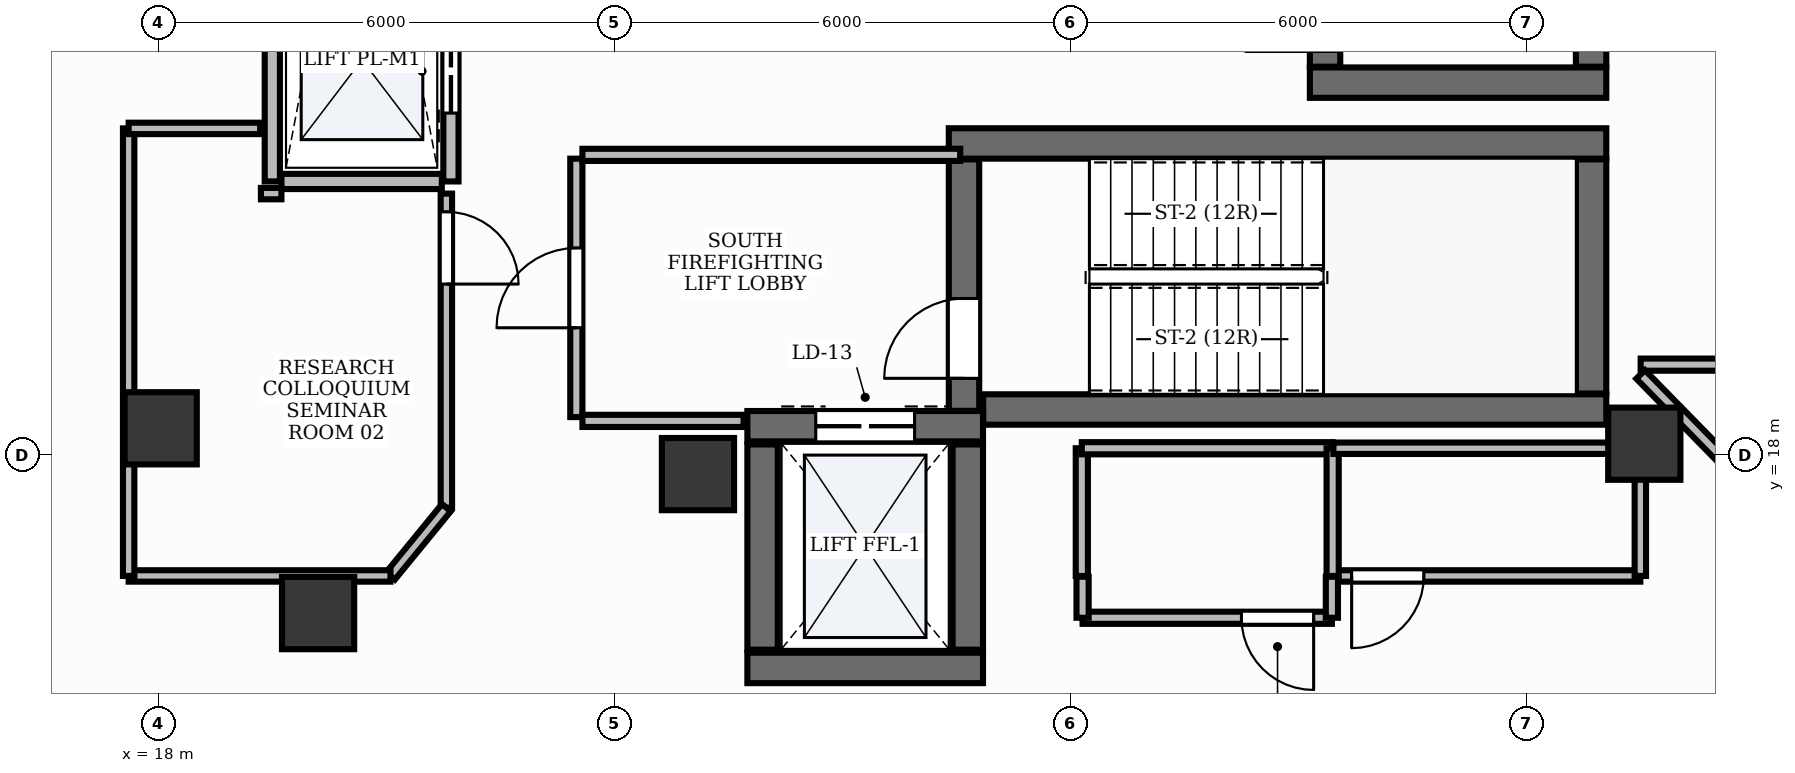
"""IFC4 building model, lengths in metres.
Left out: names, types, materials, properties, quantities, classifications, styles, units other than length and angle.
Written with IfcOpenShell. Run it as: python <this file> out.ifc"""

import sys

from ifc_helpers import new_model, si_unit, direction, frame, frame_2d, origin, origin_2d, place, context, subcontext, project, spatial, rectangle, extrude, element, fill, save


model = new_model("IFC4")
c1 = context("Model", 3, precision=1e-05, world=origin(), true_north=direction((0.0, 1.0)))
c2 = subcontext(c1, "Body", "Model", "MODEL_VIEW")
j1 = project(units=[si_unit("LENGTHUNIT", "METRE"), si_unit("PLANEANGLEUNIT", "RADIAN")], contexts=[c1])
p1 = place(None, origin())
s1 = spatial("IfcSite", under=j1, at=p1, CompositionType="ELEMENT")
p2 = place(p1, origin())
s2 = spatial("IfcBuilding", under=s1, at=p2, CompositionType="ELEMENT")
p3 = place(p2, frame((0.0, 0.0, 252.0)))
s3 = spatial("IfcBuildingStorey", under=s2, at=p3, CompositionType="ELEMENT", Elevation=252.0)
p4 = place(p3, frame((28.852, 18.6, 0.0), z_axis=(0.0, 0.0, 1.0), x_axis=(1.0, 0.0, 0.0)))
e1 = element("IfcWall", 1, at=p4, inside=s3, PredefinedType="SHEAR", context=c2, shape_type="SweptSolid", body=[
    extrude(rectangle(XDim=8.198, YDim=0.4, at=frame_2d((4.099, 0.0))), origin(), (0.0, 0.0, 1.0), 3.9),
])
p5 = place(p3, frame((28.4, 22.1, 0.0), z_axis=(0.0, 0.0, 1.0), x_axis=(1.0, 0.0, 0.0)))
e2 = element("IfcWall", 2, at=p5, inside=s3, PredefinedType="SHEAR", context=c2, shape_type="SweptSolid", body=[
    extrude(rectangle(XDim=8.65, YDim=0.4, at=frame_2d((4.325, 0.0))), origin(), (0.0, 0.0, 1.0), 3.9),
])
p6 = place(p3, frame((36.85, 18.81, 0.0), z_axis=(0.0, 0.0, 1.0), x_axis=(0.0, 1.0, 0.0)))
e3 = element("IfcWall", 3, at=p6, inside=s3, PredefinedType="SHEAR", context=c2, shape_type="SweptSolid", body=[
    extrude(rectangle(XDim=3.08, YDim=0.4, at=frame_2d((1.54, 0.0))), origin(), (0.0, 0.0, 1.0), 3.9),
])
p7 = place(p3, frame((28.6, 18.582, 0.0), z_axis=(0.0, 0.0, 1.0), x_axis=(0.0, 1.0, 0.0)))
e4 = element("IfcWall", 4, at=p7, inside=s3, PredefinedType="SHEAR", context=c2, shape_type="SweptSolid", body=[
    extrude(rectangle(XDim=3.308, YDim=0.4, at=frame_2d((1.654, 0.0))), origin(), (0.0, 0.0, 1.0), 3.9),
])
p8 = place(p7, frame((0.428, 0.0, 0.0)))
e5 = element("IfcOpeningElement", 5, at=p8, cuts=e4, PredefinedType="OPENING", context=c2, shape_type="SweptSolid", body=[
    extrude(rectangle(XDim=1.05, YDim=2.15, at=frame_2d((0.525, 1.075))), frame((0.0, 0.215, 0.0), z_axis=(0.0, -1.0, 0.0), x_axis=(1.0, 0.0, 0.0)), (0.0, 0.0, 1.0), 0.43),
])
p9 = place(p3, frame((33.15, 22.9, 0.0), z_axis=(0.0, 0.0, 1.0), x_axis=(1.0, 0.0, 0.0)))
e6 = element("IfcWall", 6, at=p9, inside=s3, PredefinedType="SHEAR", context=c2, shape_type="SweptSolid", body=[
    extrude(rectangle(XDim=3.9, YDim=0.4, at=frame_2d((1.95, 0.0))), origin(), (0.0, 0.0, 1.0), 3.9),
])
p10 = place(p3, frame((36.85, 23.11, 0.0), z_axis=(0.0, 0.0, 1.0), x_axis=(0.0, 1.0, 0.0)))
e7 = element("IfcWall", 7, at=p10, inside=s3, PredefinedType="SHEAR", context=c2, shape_type="SweptSolid", body=[
    extrude(rectangle(XDim=7.78, YDim=0.4, at=frame_2d((3.89, 0.0))), origin(), (0.0, 0.0, 1.0), 3.9),
])
p11 = place(p3, frame((33.35, 23.11, 0.0), z_axis=(0.0, 0.0, 1.0), x_axis=(0.0, 1.0, 0.0)))
e8 = element("IfcWall", 8, at=p11, inside=s3, PredefinedType="SHEAR", context=c2, shape_type="SweptSolid", body=[
    extrude(rectangle(XDim=7.78, YDim=0.4, at=frame_2d((3.89, 0.0))), origin(), (0.0, 0.0, 1.0), 3.9),
])
p12 = place(p11, frame((0.2, 0.0, 0.0)))
e9 = element("IfcOpeningElement", 9, at=p12, cuts=e8, PredefinedType="OPENING", context=c2, shape_type="SweptSolid", body=[
    extrude(rectangle(XDim=1.05, YDim=2.15, at=frame_2d((0.525, 1.075))), frame((0.0, 0.215, 0.0), z_axis=(0.0, -1.0, 0.0), x_axis=(1.0, 0.0, 0.0)), (0.0, 0.0, 1.0), 0.43),
])
p13 = place(p3, frame((25.75, 15.2, 0.0), z_axis=(0.0, 0.0, 1.0), x_axis=(1.0, 0.0, 0.0)))
e10 = element("IfcWall", 10, at=p13, inside=s3, PredefinedType="SHEAR", context=c2, shape_type="SweptSolid", body=[
    extrude(rectangle(XDim=3.1, YDim=0.4, at=frame_2d((1.55, 0.0))), origin(), (0.0, 0.0, 1.0), 3.9),
])
p14 = place(p3, frame((25.75, 18.38, 0.0), z_axis=(0.0, 0.0, 1.0), x_axis=(1.0, 0.0, 0.0)))
e11 = element("IfcWall", 11, at=p14, inside=s3, PredefinedType="SHEAR", context=c2, shape_type="SweptSolid", body=[
    extrude(rectangle(XDim=3.1, YDim=0.4, at=frame_2d((1.55, 0.0))), origin(), (0.0, 0.0, 1.0), 3.9),
])
p15 = place(p14, frame((0.9, 0.0, 0.0)))
e12 = element("IfcOpeningElement", 12, at=p15, cuts=e11, PredefinedType="OPENING", context=c2, shape_type="SweptSolid", body=[
    extrude(rectangle(XDim=1.3, YDim=2.2, at=frame_2d((0.65, 1.1))), frame((0.0, 0.215, 0.0), z_axis=(0.0, -1.0, 0.0), x_axis=(1.0, 0.0, 0.0)), (0.0, 0.0, 1.0), 0.43),
])
for number, where, z_axis, x_axis in (
    (13, (25.95, 15.44, 0.0), (0.0, 0.0, 1.0), (0.0, 1.0, 0.0)),
    (14, (28.65, 15.44, 0.0), (0.0, 0.0, 1.0), (0.0, 1.0, 0.0)),
):
    element("IfcWall", number, at=place(p3, frame(where, z_axis=z_axis, x_axis=x_axis)), inside=s3, PredefinedType="SHEAR", context=c2, shape_type="SweptSolid", body=[
        extrude(rectangle(XDim=2.7, YDim=0.4, at=frame_2d((1.35, 0.0))), origin(), (0.0, 0.0, 1.0), 3.9),
    ])
for number, where, z_axis, x_axis in (
    (15, (25.1, 17.75, -0.0), (0.0, 0.0, 1.0), (1.0, 0.0, 0.0)),
    (16, (37.55, 18.15, -0.0), (0.0, 0.0, 1.0), (1.0, 0.0, 0.0)),
):
    element("IfcColumn", number, at=place(p3, frame(where, z_axis=z_axis, x_axis=x_axis)), inside=s3, PredefinedType="PILASTER", context=c2, shape_type="SweptSolid", body=[
        extrude(rectangle(XDim=0.95, YDim=0.95, at=origin_2d()), origin(), (0.0, 0.0, 1.0), 3.901),
    ])
for number, where, z_axis, x_axis in (
    (17, (18.031, 18.353, -0.0), (0.0, 0.0, 1.0), (1.0, 0.0, 0.0)),
    (18, (20.102, 15.921, -0.0), (0.0, 0.0, 1.0), (1.0, 0.0, 0.0)),
):
    element("IfcColumn", number, at=place(p3, frame(where, z_axis=z_axis, x_axis=x_axis)), inside=s3, PredefinedType="COLUMN", context=c2, shape_type="SweptSolid", body=[
        extrude(rectangle(XDim=0.95, YDim=0.95, at=origin_2d()), origin(), (0.0, 0.0, 1.0), 3.901),
    ])
p16 = place(p3, frame((19.5, 21.6, 0.0), z_axis=(0.0, 0.0, 1.0), x_axis=(0.0, 1.0, 0.0)))
e19 = element("IfcWall", 19, at=p16, inside=s3, PredefinedType="PARTITIONING", context=c2, shape_type="SweptSolid", body=[
    extrude(rectangle(XDim=10.8, YDim=0.2, at=frame_2d((5.4, 0.0))), origin(), (0.0, 0.0, 1.0), 2.91),
])
p17 = place(p3, frame((21.85, 21.6, 0.0), z_axis=(0.0, 0.0, 1.0), x_axis=(0.0, 1.0, 0.0)))
e20 = element("IfcWall", 20, at=p17, inside=s3, PredefinedType="PARTITIONING", context=c2, shape_type="SweptSolid", body=[
    extrude(rectangle(XDim=10.8, YDim=0.2, at=frame_2d((5.4, 0.0))), origin(), (0.0, 0.0, 1.0), 2.91),
])
p18 = place(p17, frame((0.9, 0.0, 0.0)))
e21 = element("IfcOpeningElement", 21, at=p18, cuts=e20, PredefinedType="OPENING", context=c2, shape_type="SweptSolid", body=[
    extrude(rectangle(XDim=1.1, YDim=2.2, at=frame_2d((0.55, 1.1))), frame((0.0, 0.115, 0.0), z_axis=(0.0, -1.0, 0.0), x_axis=(1.0, 0.0, 0.0)), (0.0, 0.0, 1.0), 0.23),
])
p19 = place(p17, frame((3.6, 0.0, 0.0)))
e22 = element("IfcOpeningElement", 22, at=p19, cuts=e20, PredefinedType="OPENING", context=c2, shape_type="SweptSolid", body=[
    extrude(rectangle(XDim=1.1, YDim=2.2, at=frame_2d((0.55, 1.1))), frame((0.0, 0.115, 0.0), z_axis=(0.0, -1.0, 0.0), x_axis=(1.0, 0.0, 0.0)), (0.0, 0.0, 1.0), 0.23),
])
p20 = place(p17, frame((6.3, 0.0, 0.0)))
e23 = element("IfcOpeningElement", 23, at=p20, cuts=e20, PredefinedType="OPENING", context=c2, shape_type="SweptSolid", body=[
    extrude(rectangle(XDim=1.1, YDim=2.2, at=frame_2d((0.55, 1.1))), frame((0.0, 0.115, 0.0), z_axis=(0.0, -1.0, 0.0), x_axis=(1.0, 0.0, 0.0)), (0.0, 0.0, 1.0), 0.23),
])
p21 = place(p17, frame((9.0, 0.0, 0.0)))
e24 = element("IfcOpeningElement", 24, at=p21, cuts=e20, PredefinedType="OPENING", context=c2, shape_type="SweptSolid", body=[
    extrude(rectangle(XDim=1.1, YDim=2.2, at=frame_2d((0.55, 1.1))), frame((0.0, 0.115, 0.0), z_axis=(0.0, -1.0, 0.0), x_axis=(1.0, 0.0, 0.0)), (0.0, 0.0, 1.0), 0.23),
])
p22 = place(p3, frame((19.62, 21.6, 0.0), z_axis=(0.0, 0.0, 1.0), x_axis=(1.0, 0.0, 0.0)))
e25 = element("IfcWall", 25, at=p22, inside=s3, PredefinedType="PARTITIONING", context=c2, shape_type="SweptSolid", body=[
    extrude(rectangle(XDim=2.11, YDim=0.2, at=frame_2d((1.055, 0.0))), origin(), (0.0, 0.0, 1.0), 2.91),
])
p23 = place(p3, frame((23.5, 18.5, 0.0), z_axis=(0.0, 0.0, 1.0), x_axis=(0.0, 1.0, 0.0)))
e26 = element("IfcWall", 26, at=p23, inside=s3, PredefinedType="PARTITIONING", context=c2, shape_type="SweptSolid", body=[
    extrude(rectangle(XDim=3.4, YDim=0.16, at=frame_2d((1.7, 0.0))), origin(), (0.0, 0.0, 1.0), 2.91),
])
p24 = place(p23, frame((1.175, 0.0, 0.0)))
e27 = element("IfcOpeningElement", 27, at=p24, cuts=e26, PredefinedType="OPENING", context=c2, shape_type="SweptSolid", body=[
    extrude(rectangle(XDim=1.05, YDim=2.15, at=frame_2d((0.525, 1.075))), frame((0.0, 0.095, 0.0), z_axis=(0.0, -1.0, 0.0), x_axis=(1.0, 0.0, 0.0)), (0.0, 0.0, 1.0), 0.19),
])
p25 = place(p3, frame((23.58, 21.95, 0.0), z_axis=(0.0, 0.0, 1.0), x_axis=(1.0, 0.0, 0.0)))
e28 = element("IfcWall", 28, at=p25, inside=s3, PredefinedType="PARTITIONING", context=c2, shape_type="SweptSolid", body=[
    extrude(rectangle(XDim=4.97, YDim=0.16, at=frame_2d((2.485, 0.0))), origin(), (0.0, 0.0, 1.0), 2.91),
])
p26 = place(p3, frame((23.58, 18.45, 0.0), z_axis=(0.0, 0.0, 1.0), x_axis=(1.0, 0.0, 0.0)))
e29 = element("IfcWall", 29, at=p26, inside=s3, PredefinedType="PARTITIONING", context=c2, shape_type="SweptSolid", body=[
    extrude(rectangle(XDim=2.12, YDim=0.16, at=frame_2d((1.06, 0.0))), origin(), (0.0, 0.0, 1.0), 2.91),
])
p27 = place(p3, frame((33.44, 15.86, 0.0), z_axis=(0.0, 0.0, 1.0), x_axis=(-1.0, 0.0, 0.0)))
e30 = element("IfcWall", 30, at=p27, inside=s3, PredefinedType="PARTITIONING", context=c2, shape_type="SweptSolid", body=[
    extrude(rectangle(XDim=3.28, YDim=0.16, at=frame_2d((1.64, 0.0))), origin(), (0.0, 0.0, 1.0), 2.91),
])
p28 = place(p27, frame((0.24, 0.0, 0.0)))
e31 = element("IfcOpeningElement", 31, at=p28, cuts=e30, PredefinedType="OPENING", context=c2, shape_type="SweptSolid", body=[
    extrude(rectangle(XDim=0.95, YDim=2.15, at=frame_2d((0.475, 1.075))), frame((0.0, 0.095, 0.0), z_axis=(0.0, -1.0, 0.0), x_axis=(1.0, 0.0, 0.0)), (0.0, 0.0, 1.0), 0.19),
])
p29 = place(p3, frame((21.79, 21.44, 0.0), z_axis=(0.0, 0.0, 1.0), x_axis=(0.0, -1.0, 0.0)))
e32 = element("IfcWall", 32, at=p29, inside=s3, PredefinedType="PARTITIONING", context=c2, shape_type="SweptSolid", body=[
    extrude(rectangle(XDim=4.132, YDim=0.15, at=frame_2d((2.066, 0.0))), origin(), (0.0, 0.0, 1.0), 2.91),
])
p30 = place(p29, frame((0.24, 0.0, 0.0)))
e33 = element("IfcOpeningElement", 33, at=p30, cuts=e32, PredefinedType="OPENING", context=c2, shape_type="SweptSolid", body=[
    extrude(rectangle(XDim=0.95, YDim=2.15, at=frame_2d((0.475, 1.075))), frame((0.0, 0.09, 0.0), z_axis=(0.0, -1.0, 0.0), x_axis=(1.0, 0.0, 0.0)), (0.0, 0.0, 1.0), 0.18),
])
p31 = place(p3, frame((37.498, 16.41, 0.0), z_axis=(0.0, 0.0, 1.0), x_axis=(-1.0, 0.0, 0.0)))
e34 = element("IfcWall", 34, at=p31, inside=s3, PredefinedType="PARTITIONING", context=c2, shape_type="SweptSolid", body=[
    extrude(rectangle(XDim=4.038, YDim=0.15, at=frame_2d((2.019, 0.0))), origin(), (0.0, 0.0, 1.0), 2.91),
])
p32 = place(p31, frame((2.848, 0.0, 0.0)))
e35 = element("IfcOpeningElement", 35, at=p32, cuts=e34, PredefinedType="OPENING", context=c2, shape_type="SweptSolid", body=[
    extrude(rectangle(XDim=0.95, YDim=2.15, at=frame_2d((0.475, 1.075))), frame((0.0, 0.09, 0.0), z_axis=(0.0, -1.0, 0.0), x_axis=(1.0, 0.0, 0.0)), (0.0, 0.0, 1.0), 0.18),
])
p33 = place(p3, frame((37.502, 19.19, 0.0), z_axis=(0.0, 0.0, 1.0), x_axis=(1.0, 0.0, 0.0)))
e36 = element("IfcWall", 36, at=p33, inside=s3, PredefinedType="PARTITIONING", context=c2, shape_type="SweptSolid", body=[
    extrude(rectangle(XDim=2.622, YDim=0.16, at=frame_2d((1.311, 0.0))), origin(), (0.0, 0.0, 1.0), 2.91),
])
p34 = place(p33, frame((1.432, 0.0, 0.0)))
e37 = element("IfcOpeningElement", 37, at=p34, cuts=e36, PredefinedType="OPENING", context=c2, shape_type="SweptSolid", body=[
    extrude(rectangle(XDim=0.95, YDim=2.15, at=frame_2d((0.475, 1.075))), frame((0.0, 0.095, 0.0), z_axis=(0.0, -1.0, 0.0), x_axis=(1.0, 0.0, 0.0)), (0.0, 0.0, 1.0), 0.19),
])
for number, where, z_axis, x_axis in (
    (38, (33.44, 16.4, 0.0), (0.0, 0.0, 1.0), (0.0, -1.0, 0.0)),
    (39, (30.16, 15.86, 0.0), (0.0, 0.0, 1.0), (0.0, 1.0, 0.0)),
):
    element("IfcWall", number, at=place(p3, frame(where, z_axis=z_axis, x_axis=x_axis)), inside=s3, PredefinedType="PARTITIONING", context=c2, shape_type="SweptSolid", body=[
        extrude(rectangle(XDim=0.54, YDim=0.16, at=frame_2d((0.27, 0.0))), origin(), (0.0, 0.0, 1.0), 2.91),
    ])
p35 = place(p3, frame((30.15, 16.41, 0.0), z_axis=(0.0, 0.0, 1.0), x_axis=(0.0, 1.0, 0.0)))
e40 = element("IfcWall", 40, at=p35, inside=s3, PredefinedType="PARTITIONING", context=c2, shape_type="SweptSolid", body=[
    extrude(rectangle(XDim=1.68, YDim=0.16, at=frame_2d((0.84, 0.0))), origin(), (0.0, 0.0, 1.0), 2.91),
])
p36 = place(p3, frame((30.15, 18.09, 0.0), z_axis=(0.0, 0.0, 1.0), x_axis=(1.0, 0.0, 0.0)))
e41 = element("IfcWall", 41, at=p36, inside=s3, PredefinedType="PARTITIONING", context=c2, shape_type="SweptSolid", body=[
    extrude(rectangle(XDim=3.3, YDim=0.16, at=frame_2d((1.65, 0.0))), origin(), (0.0, 0.0, 1.0), 2.91),
])
p37 = place(p3, frame((33.45, 18.09, 0.0), z_axis=(0.0, 0.0, 1.0), x_axis=(0.0, -1.0, 0.0)))
e42 = element("IfcWall", 42, at=p37, inside=s3, PredefinedType="PARTITIONING", context=c2, shape_type="SweptSolid", body=[
    extrude(rectangle(XDim=1.68, YDim=0.16, at=frame_2d((0.84, 0.0))), origin(), (0.0, 0.0, 1.0), 2.91),
])
p38 = place(p3, frame((19.35, 21.44, 0.0), z_axis=(0.0, 0.0, 1.0), x_axis=(1.0, 0.0, 0.0)))
e43 = element("IfcWall", 43, at=p38, inside=s3, PredefinedType="PARTITIONING", context=c2, shape_type="SweptSolid", body=[
    extrude(rectangle(XDim=0.27, YDim=0.15, at=frame_2d((0.135, 0.0))), origin(), (0.0, 0.0, 1.0), 2.91),
])
p39 = place(p3, frame((21.79, 17.308, 0.0), z_axis=(0.0, 0.0, 1.0), x_axis=(-0.633375193537, -0.773844857973, 0.0)))
e44 = element("IfcWall", 44, at=p39, inside=s3, PredefinedType="PARTITIONING", context=c2, shape_type="SweptSolid", body=[
    extrude(rectangle(XDim=1.161, YDim=0.15, at=frame_2d((0.581, 0.0))), origin(), (0.0, 0.0, 1.0), 2.91),
])
p40 = place(p3, frame((21.055, 16.41, 0.0), z_axis=(0.0, 0.0, 1.0), x_axis=(-1.0, 0.0, 0.0)))
e45 = element("IfcWall", 45, at=p40, inside=s3, PredefinedType="PARTITIONING", context=c2, shape_type="SweptSolid", body=[
    extrude(rectangle(XDim=3.445, YDim=0.15, at=frame_2d((1.722, 0.0))), origin(), (0.0, 0.0, 1.0), 2.91),
])
p41 = place(p3, frame((17.61, 16.41, 0.0), z_axis=(0.0, 0.0, 1.0), x_axis=(0.0, 1.0, 0.0)))
e46 = element("IfcWall", 46, at=p41, inside=s3, PredefinedType="PARTITIONING", context=c2, shape_type="SweptSolid", body=[
    extrude(rectangle(XDim=5.888, YDim=0.15, at=frame_2d((2.944, 0.0))), origin(), (0.0, 0.0, 1.0), 2.91),
])
p42 = place(p3, frame((17.61, 22.298, 0.0), z_axis=(0.0, 0.0, 1.0), x_axis=(1.0, 0.0, 0.0)))
e47 = element("IfcWall", 47, at=p42, inside=s3, PredefinedType="PARTITIONING", context=c2, shape_type="SweptSolid", body=[
    extrude(rectangle(XDim=1.73, YDim=0.15, at=frame_2d((0.865, 0.0))), origin(), (0.0, 0.0, 1.0), 2.91),
])
p43 = place(p3, frame((37.498, 18.364, 0.0), z_axis=(0.0, 0.0, 1.0), x_axis=(0.0, -1.0, 0.0)))
e48 = element("IfcWall", 48, at=p43, inside=s3, PredefinedType="PARTITIONING", context=c2, shape_type="SweptSolid", body=[
    extrude(rectangle(XDim=1.954, YDim=0.15, at=frame_2d((0.977, 0.0))), origin(), (0.0, 0.0, 1.0), 2.91),
])
p44 = place(p3, frame((33.46, 18.09, 0.0), z_axis=(0.0, 0.0, 1.0), x_axis=(1.0, 0.0, 0.0)))
e49 = element("IfcWall", 49, at=p44, inside=s3, PredefinedType="PARTITIONING", context=c2, shape_type="SweptSolid", body=[
    extrude(rectangle(XDim=3.89, YDim=0.15, at=frame_2d((1.945, 0.0))), origin(), (0.0, 0.0, 1.0), 2.91),
])
p45 = place(p3, frame((40.098, 16.41, 0.0), z_axis=(0.0, 0.0, 1.0), x_axis=(-0.69966677512, 0.714469316201, 0.0)))
e50 = element("IfcWall", 50, at=p45, inside=s3, PredefinedType="PARTITIONING", context=c2, shape_type="SweptSolid", body=[
    extrude(rectangle(XDim=3.711, YDim=0.16, at=frame_2d((1.855, 0.0))), origin(), (0.0, 0.0, 1.0), 2.91),
])
p46 = place(p8, origin())
e51 = element("IfcDoor", 51, at=p46, inside=s3, OperationType="SINGLE_SWING_LEFT", PredefinedType="DOOR", context=c2, shape_type="SweptSolid", body=[
    extrude(rectangle(XDim=1.05, YDim=2.15, at=frame_2d((0.525, 1.075))), frame((0.0, 0.025, 0.0), z_axis=(0.0, -1.0, 0.0), x_axis=(1.0, 0.0, 0.0)), (0.0, 0.0, 1.0), 0.05),
])
fill(e5, e51)
p47 = place(p18, origin())
e52 = element("IfcDoor", 52, at=p47, inside=s3, OperationType="DOUBLE_DOOR_SLIDING", PredefinedType="DOOR", context=c2, shape_type="SweptSolid", body=[
    extrude(rectangle(XDim=1.1, YDim=2.2, at=frame_2d((0.55, 1.1))), frame((0.0, 0.025, 0.0), z_axis=(0.0, -1.0, 0.0), x_axis=(1.0, 0.0, 0.0)), (0.0, 0.0, 1.0), 0.05),
])
fill(e21, e52)
p48 = place(p15, origin())
e53 = element("IfcDoor", 53, at=p48, inside=s3, OperationType="DOUBLE_DOOR_SLIDING", PredefinedType="DOOR", context=c2, shape_type="SweptSolid", body=[
    extrude(rectangle(XDim=1.3, YDim=2.2, at=frame_2d((0.65, 1.1))), frame((0.0, 0.025, 0.0), z_axis=(0.0, -1.0, 0.0), x_axis=(1.0, 0.0, 0.0)), (0.0, 0.0, 1.0), 0.05),
])
fill(e12, e53)
p49 = place(p24, origin())
e54 = element("IfcDoor", 54, at=p49, inside=s3, OperationType="SINGLE_SWING_LEFT", PredefinedType="DOOR", context=c2, shape_type="SweptSolid", body=[
    extrude(rectangle(XDim=1.05, YDim=2.15, at=frame_2d((0.525, 1.075))), frame((0.0, 0.025, 0.0), z_axis=(0.0, -1.0, 0.0), x_axis=(1.0, 0.0, 0.0)), (0.0, 0.0, 1.0), 0.05),
])
fill(e27, e54)
p50 = place(p28, origin())
e55 = element("IfcDoor", 55, at=p50, inside=s3, OperationType="SINGLE_SWING_LEFT", PredefinedType="DOOR", context=c2, shape_type="SweptSolid", body=[
    extrude(rectangle(XDim=0.95, YDim=2.15, at=frame_2d((0.475, 1.075))), frame((0.0, 0.025, 0.0), z_axis=(0.0, -1.0, 0.0), x_axis=(1.0, 0.0, 0.0)), (0.0, 0.0, 1.0), 0.05),
])
fill(e31, e55)
p51 = place(p30, origin())
e56 = element("IfcDoor", 56, at=p51, inside=s3, OperationType="SINGLE_SWING_RIGHT", PredefinedType="DOOR", context=c2, shape_type="SweptSolid", body=[
    extrude(rectangle(XDim=0.95, YDim=2.15, at=frame_2d((0.475, 1.075))), frame((0.0, 0.025, 0.0), z_axis=(0.0, -1.0, 0.0), x_axis=(1.0, 0.0, 0.0)), (0.0, 0.0, 1.0), 0.05),
])
fill(e33, e56)
p52 = place(p32, origin())
e57 = element("IfcDoor", 57, at=p52, inside=s3, OperationType="SINGLE_SWING_RIGHT", PredefinedType="DOOR", context=c2, shape_type="SweptSolid", body=[
    extrude(rectangle(XDim=0.95, YDim=2.15, at=frame_2d((0.475, 1.075))), frame((0.0, 0.025, 0.0), z_axis=(0.0, -1.0, 0.0), x_axis=(1.0, 0.0, 0.0)), (0.0, 0.0, 1.0), 0.05),
])
fill(e35, e57)
save(model, sys.argv[1])
